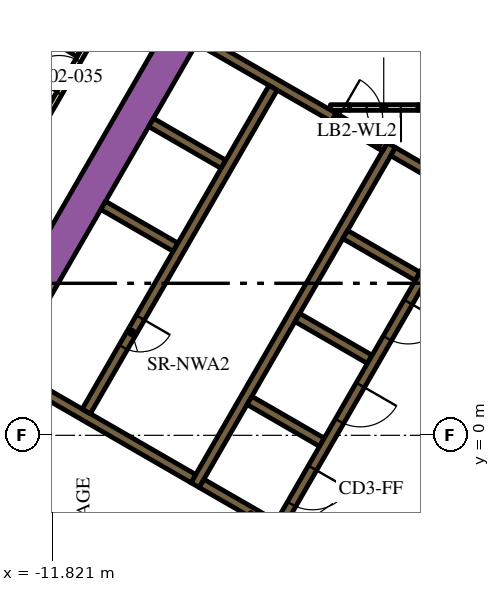
"""IFC4 building model, lengths in metres.
Left out: names, types, materials, properties, quantities, classifications, styles, units other than length and angle.
Written with IfcOpenShell. Run it as: python <this file> out.ifc"""

import sys

from ifc_helpers import new_model, si_unit, direction, frame, frame_2d, origin, place, context, subcontext, project, spatial, polyline, rectangle, outline, extrude, element, fill, save


model = new_model("IFC4")
c1 = context("Model", 3, precision=1e-05, world=origin(), true_north=direction((0.0, 1.0)))
c2 = subcontext(c1, "Body", "Model", "MODEL_VIEW")
j1 = project(units=[si_unit("LENGTHUNIT", "METRE"), si_unit("PLANEANGLEUNIT", "RADIAN")], contexts=[c1])
p1 = place(None, origin())
s1 = spatial("IfcSite", under=j1, at=p1, CompositionType="ELEMENT")
p2 = place(p1, origin())
s2 = spatial("IfcBuilding", under=s1, at=p2, CompositionType="ELEMENT")
p3 = place(p2, frame((0.0, 0.0, 39.3)))
s3 = spatial("IfcBuildingStorey", under=s2, at=p3, CompositionType="ELEMENT", Elevation=39.3)
p4 = place(p3, frame((-15.36, -1.503, 0.0), z_axis=(0.0, 0.0, 1.0), x_axis=(0.50000389221, 0.866023156604, 0.0)))
e1 = element("IfcWall", 1, at=p4, inside=s3, PredefinedType="SOLIDWALL", context=c2, shape_type="SweptSolid", body=[
    extrude(rectangle(XDim=21.0, YDim=0.9, at=frame_2d((10.5, 0.0))), origin(), (0.0, 0.0, 1.0), 3.9),
])
p5 = place(p3, frame((-8.06, -1.311, 0.0), z_axis=(0.0, 0.0, 1.0), x_axis=(0.50000273126, 0.866023826885, 0.0)))
e2 = element("IfcWall", 2, at=p5, inside=s3, PredefinedType="SOLIDWALL", context=c2, shape_type="SweptSolid", body=[
    extrude(rectangle(XDim=10.33, YDim=0.25, at=frame_2d((5.165, 0.0))), origin(), (0.0, 0.0, 1.0), 3.9),
])
p6 = place(p3, frame((-1.76, 6.836, 0.0), z_axis=(0.0, 0.0, 1.0), x_axis=(-0.865952863304, 0.500125622755, 0.0)))
e3 = element("IfcWall", 3, at=p6, inside=s3, PredefinedType="SOLIDWALL", context=c2, shape_type="SweptSolid", body=[
    extrude(rectangle(XDim=1.258, YDim=0.25, at=frame_2d((0.629, 0.0))), origin(), (0.0, 0.0, 1.0), 3.9),
])
for number, where, z_axis, x_axis in (
    (4, (-2.204, 4.182, 0.0), (0.0, 0.0, 1.0), (-0.866, 0.5, 0.0)),
    (5, (-5.369, 3.1, 0.0), (0.0, 0.0, 1.0), (0.866, -0.5, 0.0)),
    (6, (-4.724, -0.182, 0.0), (0.0, 0.0, 1.0), (-0.866, 0.5, 0.0)),
):
    element("IfcWall", number, at=place(p3, frame(where, z_axis=z_axis, x_axis=x_axis)), inside=s3, PredefinedType="SOLIDWALL", context=c2, shape_type="SweptSolid", body=[
        extrude(rectangle(XDim=2.2, YDim=0.25, at=frame_2d((1.1, 0.0))), origin(), (0.0, 0.0, 1.0), 3.9),
    ])
p7 = place(p3, origin())
e7 = element("IfcWall", 7, at=p7, inside=s3, PredefinedType="SOLIDWALL", context=c2, shape_type="SweptSolid", body=[
    extrude(outline(polyline([(-5.922, -2.257), (-5.922, -2.257), (-5.705, -2.382), (-5.83, -2.598), (-6.483, -2.221), (-6.591, -2.033), (-6.591, -2.033), (-6.7, -2.096), (-7.952, -1.373), (-7.827, -1.156), (-5.922, -2.257)])), origin(), (0.0, 0.0, 1.0), 3.9),
])
p8 = place(p3, frame((-8.106, -1.14, 0.0), z_axis=(0.0, 0.0, 1.0), x_axis=(-0.866000643155, 0.500042884217, 0.0)))
e8 = element("IfcWall", 8, at=p8, inside=s3, PredefinedType="SOLIDWALL", context=c2, shape_type="SweptSolid", body=[
    extrude(rectangle(XDim=5.65, YDim=0.25, at=frame_2d((2.825, 0.0))), origin(), (0.0, 0.0, 1.0), 3.9),
])
e9 = element("IfcWall", 9, at=p7, inside=s3, PredefinedType="SOLIDWALL", context=c2, shape_type="SweptSolid", body=[
    extrude(outline(polyline([(-3.128, 7.481), (-3.259, 7.557), (-3.134, 7.773), (-3.003, 7.698), (-3.128, 7.481)])), origin(), (0.0, 0.0, 1.0), 3.9),
])
for number, where, z_axis, x_axis in (
    (10, (-8.574, 4.95, 0.0), (0.0, 0.0, 1.0), (-0.866, 0.5, 0.0)),
    (11, (-7.314, 7.132, 0.0), (0.0, 0.0, 1.0), (-0.866, 0.5, 0.0)),
):
    element("IfcWall", number, at=place(p3, frame(where, z_axis=z_axis, x_axis=x_axis)), inside=s3, PredefinedType="SOLIDWALL", context=c2, shape_type="SweptSolid", body=[
        extrude(rectangle(XDim=2.2, YDim=0.25, at=frame_2d((1.1, 0.0))), origin(), (0.0, 0.0, 1.0), 3.9),
    ])
p9 = place(p3, frame((-7.959, 10.415, 0.0), z_axis=(0.0, 0.0, 1.0), x_axis=(0.866020958405, -0.500007699544, 0.0)))
e12 = element("IfcWall", 12, at=p9, inside=s3, PredefinedType="SOLIDWALL", context=c2, shape_type="SweptSolid", body=[
    extrude(rectangle(XDim=4.1, YDim=0.25, at=frame_2d((2.05, 0.0))), origin(), (0.0, 0.0, 1.0), 3.9),
])
p10 = place(p3, frame((-3.997, 8.625, 0.0), z_axis=(0.0, 0.0, 1.0), x_axis=(-1.0, 0.0, 0.0)))
e13 = element("IfcWall", 13, at=p10, inside=s3, PredefinedType="PARTITIONING", context=c2, shape_type="SweptSolid", body=[
    extrude(rectangle(XDim=0.502, YDim=0.15, at=frame_2d((0.251, 0.0))), origin(), (0.0, 0.0, 1.0), 2.75),
])
p11 = place(p3, frame((-2.196, 8.625, 0.0), z_axis=(0.0, 0.0, 1.0), x_axis=(1.0, 0.0, 0.0)))
e14 = element("IfcWall", 14, at=p11, inside=s3, PredefinedType="PARTITIONING", context=c2, shape_type="SweptSolid", body=[
    extrude(rectangle(XDim=1.146, YDim=0.15, at=frame_2d((0.573, 0.0))), origin(), (0.0, 0.0, 1.0), 2.75),
])
e15 = element("IfcWall", 15, at=p7, inside=s3, PredefinedType="PARTITIONING", context=c2, shape_type="SweptSolid", body=[
    extrude(outline(polyline([(-0.59, -0.872), (-0.265, -1.059), (-1.822, -3.756), (-2.147, -3.568), (-0.59, -0.872)])), origin(), (0.0, 0.0, 1.0), 2.75),
])
p12 = place(p3, frame((-6.008, 9.144, 0.0), z_axis=(0.0, 0.0, 1.0), x_axis=(-0.500006956611, -0.866021387346, 0.0)))
e16 = element("IfcWall", 16, at=p12, inside=s3, PredefinedType="SOLIDWALL", context=c2, shape_type="SweptSolid", body=[
    extrude(rectangle(XDim=9.83, YDim=0.25, at=frame_2d((4.915, 0.0))), origin(), (0.0, 0.0, 1.0), 3.9),
])
p13 = place(p12, frame((6.985, 0.0, 0.0)))
e17 = element("IfcOpeningElement", 17, at=p13, cuts=e16, PredefinedType="OPENING", context=c2, shape_type="SweptSolid", body=[
    extrude(rectangle(XDim=0.9, YDim=2.1, at=frame_2d((0.45, 1.05))), frame((0.0, 0.135, 0.0), z_axis=(0.0, -1.0, 0.0), x_axis=(1.0, 0.0, 0.0)), (0.0, 0.0, 1.0), 0.27),
])
p14 = place(p3, frame((-0.898, 6.194, 0.0), z_axis=(0.0, 0.0, 1.0), x_axis=(-0.499996202215, -0.866027596426, 0.0)))
e18 = element("IfcWall", 18, at=p14, inside=s3, PredefinedType="SOLIDWALL", context=c2, shape_type="SweptSolid", body=[
    extrude(rectangle(XDim=9.83, YDim=0.25, at=frame_2d((4.915, 0.0))), origin(), (0.0, 0.0, 1.0), 3.9),
])
p15 = place(p14, frame((0.585, 0.0, 0.0)))
e19 = element("IfcOpeningElement", 19, at=p15, cuts=e18, PredefinedType="OPENING", context=c2, shape_type="SweptSolid", body=[
    extrude(rectangle(XDim=1.1, YDim=2.1, at=frame_2d((0.55, 1.05))), frame((0.0, 0.135, 0.0), z_axis=(0.0, -1.0, 0.0), x_axis=(1.0, 0.0, 0.0)), (0.0, 0.0, 1.0), 0.27),
])
p16 = place(p14, frame((3.105, 0.0, 0.0)))
e20 = element("IfcOpeningElement", 20, at=p16, cuts=e18, PredefinedType="OPENING", context=c2, shape_type="SweptSolid", body=[
    extrude(rectangle(XDim=1.1, YDim=2.1, at=frame_2d((0.55, 1.05))), frame((0.0, 0.135, 0.0), z_axis=(0.0, -1.0, 0.0), x_axis=(1.0, 0.0, 0.0)), (0.0, 0.0, 1.0), 0.27),
])
p17 = place(p14, frame((5.625, 0.0, 0.0)))
e21 = element("IfcOpeningElement", 21, at=p17, cuts=e18, PredefinedType="OPENING", context=c2, shape_type="SweptSolid", body=[
    extrude(rectangle(XDim=1.1, YDim=2.1, at=frame_2d((0.55, 1.05))), frame((0.0, 0.135, 0.0), z_axis=(0.0, -1.0, 0.0), x_axis=(1.0, 0.0, 0.0)), (0.0, 0.0, 1.0), 0.27),
])
p18 = place(p14, frame((8.145, 0.0, 0.0)))
e22 = element("IfcOpeningElement", 22, at=p18, cuts=e18, PredefinedType="OPENING", context=c2, shape_type="SweptSolid", body=[
    extrude(rectangle(XDim=1.1, YDim=2.1, at=frame_2d((0.55, 1.05))), frame((0.0, 0.135, 0.0), z_axis=(0.0, -1.0, 0.0), x_axis=(1.0, 0.0, 0.0)), (0.0, 0.0, 1.0), 0.27),
])
p19 = place(p3, frame((-2.196, 8.625, 0.0), z_axis=(0.0, 0.0, 1.0), x_axis=(-1.0, 0.0, 0.0)))
e23 = element("IfcWall", 23, at=p19, inside=s3, PredefinedType="PARTITIONING", context=c2, shape_type="SweptSolid", body=[
    extrude(rectangle(XDim=1.8, YDim=0.15, at=frame_2d((0.9, 0.0))), origin(), (0.0, 0.0, 1.0), 2.75),
])
p20 = place(p19, frame((0.45, 0.0, 0.0)))
e24 = element("IfcOpeningElement", 24, at=p20, cuts=e23, PredefinedType="OPENING", context=c2, shape_type="SweptSolid", body=[
    extrude(rectangle(XDim=0.9, YDim=2.1, at=frame_2d((0.45, 1.05))), frame((0.0, 0.085, 0.0), z_axis=(0.0, -1.0, 0.0), x_axis=(1.0, 0.0, 0.0)), (0.0, 0.0, 1.0), 0.17),
])
p21 = place(p3, frame((-4.409, 8.365, 0.0), z_axis=(0.0, 0.0, 1.0), x_axis=(0.866034573852, -0.49998411664, 0.0)))
e25 = element("IfcWall", 25, at=p21, inside=s3, PredefinedType="SOLIDWALL", context=c2, shape_type="SweptSolid", body=[
    extrude(rectangle(XDim=1.4, YDim=0.25, at=frame_2d((0.7, 0.0))), origin(), (0.0, 0.0, 1.0), 3.9),
])
p22 = place(p21, frame((0.1, 0.0, 0.0)))
e26 = element("IfcOpeningElement", 26, at=p22, cuts=e25, PredefinedType="OPENING", context=c2, shape_type="SweptSolid", body=[
    extrude(rectangle(XDim=1.2, YDim=2.1, at=frame_2d((0.6, 1.05))), frame((0.0, 0.135, 0.0), z_axis=(0.0, -1.0, 0.0), x_axis=(1.0, 0.0, 0.0)), (0.0, 0.0, 1.0), 0.27),
])
p23 = place(p3, frame((-19.081, -3.9, 0.0), z_axis=(0.0, 0.0, 1.0), x_axis=(0.499998313975, 0.866026377209, 0.0)))
e27 = element("IfcWall", 27, at=p23, inside=s3, PredefinedType="PARTITIONING", context=c2, shape_type="SweptSolid", body=[
    extrude(rectangle(XDim=25.766, YDim=0.15, at=frame_2d((12.883, 0.0))), origin(), (0.0, 0.0, 1.0), 2.75),
])
p24 = place(p23, frame((16.196, 0.0, 0.0)))
e28 = element("IfcOpeningElement", 28, at=p24, cuts=e27, PredefinedType="OPENING", context=c2, shape_type="SweptSolid", body=[
    extrude(rectangle(XDim=1.0, YDim=2.1, at=frame_2d((0.5, 1.05))), frame((0.0, 0.085, 0.0), z_axis=(0.0, -1.0, 0.0), x_axis=(1.0, 0.0, 0.0)), (0.0, 0.0, 1.0), 0.17),
])
p25 = place(p23, frame((14.889, 0.0, 0.0)))
e29 = element("IfcOpeningElement", 29, at=p25, cuts=e27, PredefinedType="OPENING", context=c2, shape_type="SweptSolid", body=[
    extrude(rectangle(XDim=1.0, YDim=2.1, at=frame_2d((0.5, 1.05))), frame((0.0, 0.085, 0.0), z_axis=(0.0, -1.0, 0.0), x_axis=(1.0, 0.0, 0.0)), (0.0, 0.0, 1.0), 0.17),
])
p26 = place(p23, frame((3.698, 0.0, 0.0)))
e30 = element("IfcOpeningElement", 30, at=p26, cuts=e27, PredefinedType="OPENING", context=c2, shape_type="SweptSolid", body=[
    extrude(rectangle(XDim=1.1, YDim=2.1, at=frame_2d((0.55, 1.05))), frame((0.0, 0.085, 0.0), z_axis=(0.0, -1.0, 0.0), x_axis=(1.0, 0.0, 0.0)), (0.0, 0.0, 1.0), 0.17),
])
p27 = place(p23, frame((2.392, 0.0, 0.0)))
e31 = element("IfcOpeningElement", 31, at=p27, cuts=e27, PredefinedType="OPENING", context=c2, shape_type="SweptSolid", body=[
    extrude(rectangle(XDim=1.0, YDim=2.1, at=frame_2d((0.5, 1.05))), frame((0.0, 0.085, 0.0), z_axis=(0.0, -1.0, 0.0), x_axis=(1.0, 0.0, 0.0)), (0.0, 0.0, 1.0), 0.17),
])
p28 = place(p3, frame((-17.856, 13.999, 0.0), z_axis=(0.0, 0.0, 1.0), x_axis=(0.861371519381, -0.507975497047, 0.0)))
e32 = element("IfcWall", 32, at=p28, inside=s3, PredefinedType="PARTITIONING", context=c2, shape_type="SweptSolid", body=[
    extrude(rectangle(XDim=7.804, YDim=0.15, at=frame_2d((3.902, 0.0))), origin(), (0.0, 0.0, 1.0), 2.75),
])
p29 = place(p13, origin())
e33 = element("IfcDoor", 33, at=p29, inside=s3, OperationType="SINGLE_SWING_LEFT", PredefinedType="DOOR", context=c2, shape_type="SweptSolid", body=[
    extrude(rectangle(XDim=0.9, YDim=2.1, at=frame_2d((0.45, 1.05))), frame((0.0, 0.025, 0.0), z_axis=(0.0, -1.0, 0.0), x_axis=(1.0, 0.0, 0.0)), (0.0, 0.0, 1.0), 0.05),
])
fill(e17, e33)
p30 = place(p16, origin())
e34 = element("IfcDoor", 34, at=p30, inside=s3, OperationType="DOUBLE_DOOR_SLIDING", PredefinedType="DOOR", context=c2, shape_type="SweptSolid", body=[
    extrude(rectangle(XDim=1.1, YDim=2.1, at=frame_2d((0.55, 1.05))), frame((0.0, 0.025, 0.0), z_axis=(0.0, -1.0, 0.0), x_axis=(1.0, 0.0, 0.0)), (0.0, 0.0, 1.0), 0.05),
])
fill(e20, e34)
p31 = place(p17, origin())
e35 = element("IfcDoor", 35, at=p31, inside=s3, OperationType="DOUBLE_DOOR_SLIDING", PredefinedType="DOOR", context=c2, shape_type="SweptSolid", body=[
    extrude(rectangle(XDim=1.1, YDim=2.1, at=frame_2d((0.55, 1.05))), frame((0.0, 0.025, 0.0), z_axis=(0.0, -1.0, 0.0), x_axis=(1.0, 0.0, 0.0)), (0.0, 0.0, 1.0), 0.05),
])
fill(e21, e35)
p32 = place(p18, origin())
e36 = element("IfcDoor", 36, at=p32, inside=s3, OperationType="DOUBLE_DOOR_SLIDING", PredefinedType="DOOR", context=c2, shape_type="SweptSolid", body=[
    extrude(rectangle(XDim=1.1, YDim=2.1, at=frame_2d((0.55, 1.05))), frame((0.0, 0.025, 0.0), z_axis=(0.0, -1.0, 0.0), x_axis=(1.0, 0.0, 0.0)), (0.0, 0.0, 1.0), 0.05),
])
fill(e22, e36)
p33 = place(p20, origin())
e37 = element("IfcDoor", 37, at=p33, inside=s3, OperationType="SINGLE_SWING_LEFT", PredefinedType="DOOR", context=c2, shape_type="SweptSolid", body=[
    extrude(rectangle(XDim=0.9, YDim=2.1, at=frame_2d((0.45, 1.05))), frame((0.0, 0.025, 0.0), z_axis=(0.0, -1.0, 0.0), x_axis=(1.0, 0.0, 0.0)), (0.0, 0.0, 1.0), 0.05),
])
fill(e24, e37)
p34 = place(p22, origin())
e38 = element("IfcDoor", 38, at=p34, inside=s3, OperationType="SINGLE_SWING_LEFT", PredefinedType="DOOR", context=c2, shape_type="SweptSolid", body=[
    extrude(rectangle(XDim=1.2, YDim=2.1, at=frame_2d((0.6, 1.05))), frame((0.0, 0.025, 0.0), z_axis=(0.0, -1.0, 0.0), x_axis=(1.0, 0.0, 0.0)), (0.0, 0.0, 1.0), 0.05),
])
fill(e26, e38)
p35 = place(p25, origin())
e39 = element("IfcDoor", 39, at=p35, inside=s3, OperationType="SINGLE_SWING_RIGHT", PredefinedType="DOOR", context=c2, shape_type="SweptSolid", body=[
    extrude(rectangle(XDim=1.0, YDim=2.1, at=frame_2d((0.5, 1.05))), frame((0.0, 0.025, 0.0), z_axis=(0.0, -1.0, 0.0), x_axis=(1.0, 0.0, 0.0)), (0.0, 0.0, 1.0), 0.05),
])
fill(e29, e39)
save(model, sys.argv[1])
